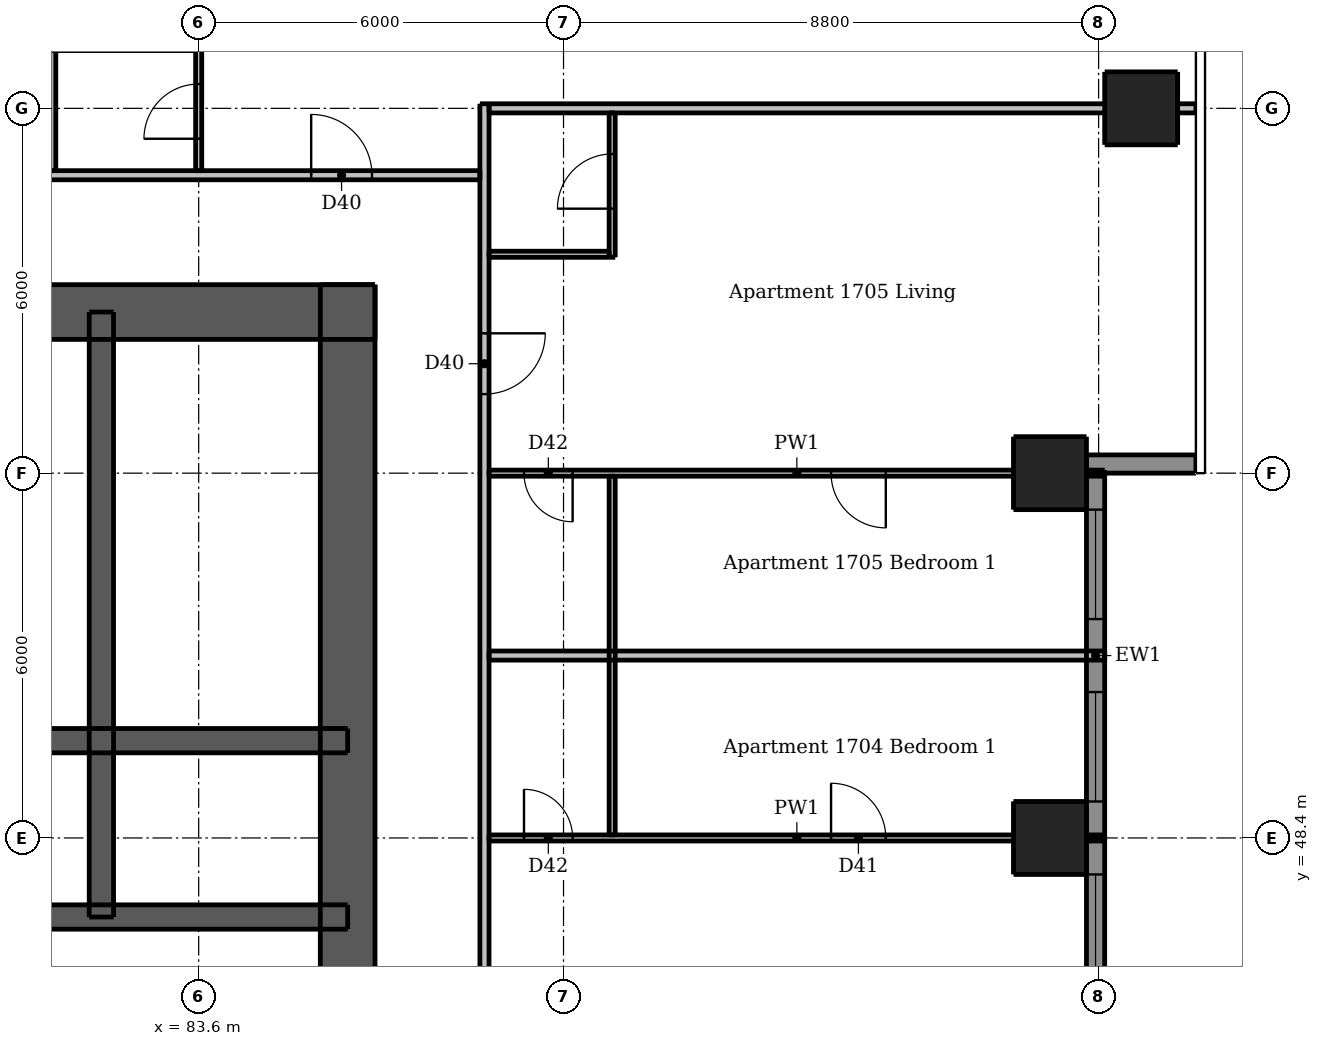
"""IFC4 building model, lengths in metres.
Left out: names, types, materials, properties, quantities, classifications, styles, units other than length and angle.
Written with IfcOpenShell. Run it as: python <this file> out.ifc"""

import sys

from ifc_helpers import new_model, si_unit, direction, frame, frame_2d, origin, origin_2d, place, context, subcontext, project, spatial, rectangle, extrude, element, fill, save


model = new_model("IFC4")
c1 = context("Model", 3, precision=1e-05, world=origin(), true_north=direction((0.0, 1.0)))
c2 = subcontext(c1, "Body", "Model", "MODEL_VIEW")
j1 = project(units=[si_unit("LENGTHUNIT", "METRE"), si_unit("PLANEANGLEUNIT", "RADIAN")], contexts=[c1])
p1 = place(None, origin())
s1 = spatial("IfcSite", under=j1, at=p1, CompositionType="ELEMENT")
p2 = place(p1, origin())
s2 = spatial("IfcBuilding", under=s1, at=p2, CompositionType="ELEMENT")
p3 = place(p2, frame((0.0, 0.0, 63.1)))
s3 = spatial("IfcBuildingStorey", under=s2, at=p3, CompositionType="ELEMENT", Elevation=63.1)
p4 = place(p3, frame((62.5, 57.05, 0.0), z_axis=(0.0, 0.0, 1.0), x_axis=(1.0, 0.0, 0.0)))
e1 = element("IfcWall", 1, at=p4, inside=s3, PredefinedType="SHEAR", context=c2, shape_type="SweptSolid", body=[
    extrude(rectangle(XDim=24.0, YDim=0.9, at=frame_2d((12.0, 0.0))), origin(), (0.0, 0.0, 1.0), 3.05),
])
p5 = place(p4, frame((20.85, 0.0, 0.0)))
e2 = element("IfcOpeningElement", 2, at=p5, cuts=e1, PredefinedType="OPENING", context=c2, shape_type="SweptSolid", body=[
    extrude(rectangle(XDim=1.1, YDim=2.1, at=frame_2d((0.55, 1.05))), frame((0.0, 0.46, 0.0), z_axis=(0.0, -1.0, 0.0), x_axis=(1.0, 0.0, 0.0)), (0.0, 0.0, 1.0), 0.92),
])
p6 = place(p4, frame((2.05, 0.0, 0.0)))
e3 = element("IfcOpeningElement", 3, at=p6, cuts=e1, PredefinedType="OPENING", context=c2, shape_type="SweptSolid", body=[
    extrude(rectangle(XDim=1.1, YDim=2.1, at=frame_2d((0.55, 1.05))), frame((0.0, 0.46, 0.0), z_axis=(0.0, -1.0, 0.0), x_axis=(1.0, 0.0, 0.0)), (0.0, 0.0, 1.0), 0.92),
])
p7 = place(p4, frame((6.44, 0.0, 0.0)))
e4 = element("IfcOpeningElement", 4, at=p7, cuts=e1, PredefinedType="OPENING", context=c2, shape_type="SweptSolid", body=[
    extrude(rectangle(XDim=0.9, YDim=2.1, at=frame_2d((0.45, 1.05))), frame((0.0, 0.46, 0.0), z_axis=(0.0, -1.0, 0.0), x_axis=(1.0, 0.0, 0.0)), (0.0, 0.0, 1.0), 0.92),
])
p8 = place(p4, frame((13.74, 0.0, 0.0)))
e5 = element("IfcOpeningElement", 5, at=p8, cuts=e1, PredefinedType="OPENING", context=c2, shape_type="SweptSolid", body=[
    extrude(rectangle(XDim=0.9, YDim=2.1, at=frame_2d((0.45, 1.05))), frame((0.0, 0.46, 0.0), z_axis=(0.0, -1.0, 0.0), x_axis=(1.0, 0.0, 0.0)), (0.0, 0.0, 1.0), 0.92),
])
p9 = place(p3, frame((86.05, 33.5, 0.0), z_axis=(0.0, 0.0, 1.0), x_axis=(0.0, 1.0, 0.0)))
e6 = element("IfcWall", 6, at=p9, inside=s3, PredefinedType="SHEAR", context=c2, shape_type="SweptSolid", body=[
    extrude(rectangle(XDim=24.0, YDim=0.9, at=frame_2d((12.0, 0.0))), origin(), (0.0, 0.0, 1.0), 3.05),
])
p10 = place(p9, frame((11.2, 0.0, 0.0)))
e7 = element("IfcOpeningElement", 7, at=p10, cuts=e6, PredefinedType="OPENING", context=c2, shape_type="SweptSolid", body=[
    extrude(rectangle(XDim=1.6, YDim=2.1, at=frame_2d((0.8, 1.05))), frame((0.0, 0.46, 0.0), z_axis=(0.0, -1.0, 0.0), x_axis=(1.0, 0.0, 0.0)), (0.0, 0.0, 1.0), 0.92),
])
p11 = place(p3, frame((62.95, 47.1, 0.0), z_axis=(0.0, 0.0, 1.0), x_axis=(1.0, 0.0, 0.0)))
e8 = element("IfcWall", 8, at=p11, inside=s3, PredefinedType="SHEAR", context=c2, shape_type="SweptSolid", body=[
    extrude(rectangle(XDim=23.1, YDim=0.4, at=frame_2d((11.55, 0.0))), origin(), (0.0, 0.0, 1.0), 3.05),
])
p12 = place(p11, frame((0.662, 0.0, 0.0)))
e9 = element("IfcOpeningElement", 9, at=p12, cuts=e8, PredefinedType="OPENING", context=c2, shape_type="SweptSolid", body=[
    extrude(rectangle(XDim=0.8, YDim=2.1, at=frame_2d((0.4, 1.05))), frame((0.0, 0.21, 0.0), z_axis=(0.0, -1.0, 0.0), x_axis=(1.0, 0.0, 0.0)), (0.0, 0.0, 1.0), 0.42),
])
p13 = place(p11, frame((2.312, 0.0, 0.0)))
e10 = element("IfcOpeningElement", 10, at=p13, cuts=e8, PredefinedType="OPENING", context=c2, shape_type="SweptSolid", body=[
    extrude(rectangle(XDim=0.9, YDim=2.1, at=frame_2d((0.45, 1.05))), frame((0.0, 0.21, 0.0), z_axis=(0.0, -1.0, 0.0), x_axis=(1.0, 0.0, 0.0)), (0.0, 0.0, 1.0), 0.42),
])
p14 = place(p11, frame((20.5, 0.0, 0.0)))
e11 = element("IfcOpeningElement", 11, at=p14, cuts=e8, PredefinedType="OPENING", context=c2, shape_type="SweptSolid", body=[
    extrude(rectangle(XDim=0.9, YDim=2.1, at=frame_2d((0.45, 1.05))), frame((0.0, 0.21, 0.0), z_axis=(0.0, -1.0, 0.0), x_axis=(1.0, 0.0, 0.0)), (0.0, 0.0, 1.0), 0.42),
])
p15 = place(p3, frame((62.95, 50.0, 0.0), z_axis=(0.0, 0.0, 1.0), x_axis=(1.0, 0.0, 0.0)))
e12 = element("IfcWall", 12, at=p15, inside=s3, PredefinedType="SHEAR", context=c2, shape_type="SweptSolid", body=[
    extrude(rectangle(XDim=23.1, YDim=0.4, at=frame_2d((11.55, 0.0))), origin(), (0.0, 0.0, 1.0), 3.05),
])
p16 = place(p3, frame((82.0, 47.1, 0.0), z_axis=(0.0, 0.0, 1.0), x_axis=(0.0, 1.0, 0.0)))
e13 = element("IfcWall", 13, at=p16, inside=s3, PredefinedType="SHEAR", context=c2, shape_type="SweptSolid", body=[
    extrude(rectangle(XDim=9.95, YDim=0.4, at=frame_2d((4.975, 0.0))), origin(), (0.0, 0.0, 1.0), 3.05),
])
for number, where, z_axis, x_axis in (
    (14, (97.6, 48.4, 0.0), (0.0, 0.0, 1.0), (1.0, 0.0, 0.0)),
    (15, (97.6, 54.4, 0.0), (0.0, 0.0, 1.0), (1.0, 0.0, 0.0)),
    (16, (99.1, 60.4, 0.0), (0.0, 0.0, 1.0), (1.0, 0.0, 0.0)),
):
    element("IfcColumn", number, at=place(p3, frame(where, z_axis=z_axis, x_axis=x_axis)), inside=s3, PredefinedType="COLUMN", context=c2, shape_type="SweptSolid", body=[
        extrude(rectangle(XDim=1.2, YDim=1.2, at=origin_2d()), origin(), (0.0, 0.0, 1.0), 3.05),
    ])
p17 = place(p3, frame((98.2, 54.55, 0.0), z_axis=(0.0, 0.0, 1.0), x_axis=(1.0, 0.0, 0.0)))
e17 = element("IfcWall", 17, at=p17, inside=s3, PredefinedType="SOLIDWALL", context=c2, shape_type="SweptSolid", body=[
    extrude(rectangle(XDim=1.8, YDim=0.3, at=frame_2d((0.9, 0.0))), origin(), (0.0, 0.0, 1.0), 3.05),
])
p18 = place(p3, frame((98.35, 42.7, 0.0), z_axis=(0.0, 0.0, 1.0), x_axis=(0.0, 1.0, 0.0)))
e18 = element("IfcWall", 18, at=p18, inside=s3, PredefinedType="SOLIDWALL", context=c2, shape_type="SweptSolid", body=[
    extrude(rectangle(XDim=5.7, YDim=0.3, at=frame_2d((2.85, 0.0))), origin(), (0.0, 0.0, 1.0), 3.05),
])
p19 = place(p18, frame((0.3, 0.0, 0.15)))
e19 = element("IfcOpeningElement", 19, at=p19, cuts=e18, PredefinedType="OPENING", context=c2, shape_type="SweptSolid", body=[
    extrude(rectangle(XDim=1.8, YDim=2.1, at=frame_2d((0.9, 1.05))), frame((0.0, 0.16, 0.0), z_axis=(0.0, -1.0, 0.0), x_axis=(1.0, 0.0, 0.0)), (0.0, 0.0, 1.0), 0.32),
])
p20 = place(p18, frame((3.3, 0.0, 0.15)))
e20 = element("IfcOpeningElement", 20, at=p20, cuts=e18, PredefinedType="OPENING", context=c2, shape_type="SweptSolid", body=[
    extrude(rectangle(XDim=1.8, YDim=2.1, at=frame_2d((0.9, 1.05))), frame((0.0, 0.16, 0.0), z_axis=(0.0, -1.0, 0.0), x_axis=(1.0, 0.0, 0.0)), (0.0, 0.0, 1.0), 0.32),
])
p21 = place(p3, frame((98.35, 48.4, 0.0), z_axis=(0.0, 0.0, 1.0), x_axis=(0.0, 1.0, 0.0)))
e21 = element("IfcWall", 21, at=p21, inside=s3, PredefinedType="SOLIDWALL", context=c2, shape_type="SweptSolid", body=[
    extrude(rectangle(XDim=6.0, YDim=0.3, at=frame_2d((3.0, 0.0))), origin(), (0.0, 0.0, 1.0), 3.05),
])
p22 = place(p21, frame((0.6, 0.0, 0.15)))
e22 = element("IfcOpeningElement", 22, at=p22, cuts=e21, PredefinedType="OPENING", context=c2, shape_type="SweptSolid", body=[
    extrude(rectangle(XDim=1.8, YDim=2.1, at=frame_2d((0.9, 1.05))), frame((0.0, 0.16, 0.0), z_axis=(0.0, -1.0, 0.0), x_axis=(1.0, 0.0, 0.0)), (0.0, 0.0, 1.0), 0.32),
])
p23 = place(p21, frame((3.6, 0.0, 0.15)))
e23 = element("IfcOpeningElement", 23, at=p23, cuts=e21, PredefinedType="OPENING", context=c2, shape_type="SweptSolid", body=[
    extrude(rectangle(XDim=1.8, YDim=2.1, at=frame_2d((0.9, 1.05))), frame((0.0, 0.16, 0.0), z_axis=(0.0, -1.0, 0.0), x_axis=(1.0, 0.0, 0.0)), (0.0, 0.0, 1.0), 0.32),
])
p24 = place(p3, frame((81.2, 59.375, 0.0), z_axis=(0.0, 0.0, 1.0), x_axis=(0.0, 1.0, 0.0)))
e24 = element("IfcWall", 24, at=p24, inside=s3, PredefinedType="PARTITIONING", context=c2, shape_type="SweptSolid", body=[
    extrude(rectangle(XDim=1.975, YDim=0.1, at=frame_2d((0.988, 0.0))), origin(), (0.0, 0.0, 1.0), 3.05),
])
p25 = place(p3, frame((83.6, 59.375, 0.0), z_axis=(0.0, 0.0, 1.0), x_axis=(0.0, 1.0, 0.0)))
e25 = element("IfcWall", 25, at=p25, inside=s3, PredefinedType="PARTITIONING", context=c2, shape_type="SweptSolid", body=[
    extrude(rectangle(XDim=8.625, YDim=0.1, at=frame_2d((4.312, 0.0))), origin(), (0.0, 0.0, 1.0), 2.516),
])
p26 = place(p25, frame((0.525, 0.0, 0.0)))
e26 = element("IfcOpeningElement", 26, at=p26, cuts=e25, PredefinedType="OPENING", context=c2, shape_type="SweptSolid", body=[
    extrude(rectangle(XDim=0.9, YDim=2.1, at=frame_2d((0.45, 1.05))), frame((0.0, 0.06, 0.0), z_axis=(0.0, -1.0, 0.0), x_axis=(1.0, 0.0, 0.0)), (0.0, 0.0, 1.0), 0.12),
])
p27 = place(p25, frame((4.875, 0.0, 0.0)))
e27 = element("IfcOpeningElement", 27, at=p27, cuts=e25, PredefinedType="OPENING", context=c2, shape_type="SweptSolid", body=[
    extrude(rectangle(XDim=0.9, YDim=2.1, at=frame_2d((0.45, 1.05))), frame((0.0, 0.06, 0.0), z_axis=(0.0, -1.0, 0.0), x_axis=(1.0, 0.0, 0.0)), (0.0, 0.0, 1.0), 0.12),
])
p28 = place(p3, frame((90.4, 48.45, 0.0), z_axis=(0.0, 0.0, 1.0), x_axis=(0.0, 1.0, 0.0)))
e28 = element("IfcWall", 28, at=p28, inside=s3, PredefinedType="PARTITIONING", context=c2, shape_type="SweptSolid", body=[
    extrude(rectangle(XDim=5.9, YDim=0.1, at=frame_2d((2.95, 0.0))), origin(), (0.0, 0.0, 1.0), 3.05),
])
p29 = place(p3, frame((90.4, 57.95, 0.0), z_axis=(0.0, 0.0, 1.0), x_axis=(0.0, 1.0, 0.0)))
e29 = element("IfcWall", 29, at=p29, inside=s3, PredefinedType="PARTITIONING", context=c2, shape_type="SweptSolid", body=[
    extrude(rectangle(XDim=2.375, YDim=0.1, at=frame_2d((1.188, 0.0))), origin(), (0.0, 0.0, 1.0), 3.05),
])
p30 = place(p29, frame((0.8, 0.0, 0.0)))
e30 = element("IfcOpeningElement", 30, at=p30, cuts=e29, PredefinedType="OPENING", context=c2, shape_type="SweptSolid", body=[
    extrude(rectangle(XDim=0.9, YDim=2.1, at=frame_2d((0.45, 1.05))), frame((0.0, 0.06, 0.0), z_axis=(0.0, -1.0, 0.0), x_axis=(1.0, 0.0, 0.0)), (0.0, 0.0, 1.0), 0.12),
])
p31 = place(p3, frame((88.375, 58.0, 0.0), z_axis=(0.0, 0.0, 1.0), x_axis=(1.0, 0.0, 0.0)))
e31 = element("IfcWall", 31, at=p31, inside=s3, PredefinedType="PARTITIONING", context=c2, shape_type="SweptSolid", body=[
    extrude(rectangle(XDim=1.975, YDim=0.1, at=frame_2d((0.988, 0.0))), origin(), (0.0, 0.0, 1.0), 3.05),
])
p32 = place(p3, frame((98.5, 54.4, 0.0), z_axis=(0.0, 0.0, 1.0), x_axis=(-1.0, 0.0, 0.0)))
e32 = element("IfcWall", 32, at=p32, inside=s3, PredefinedType="PARTITIONING", context=c2, shape_type="SweptSolid", body=[
    extrude(rectangle(XDim=10.125, YDim=0.1, at=frame_2d((5.062, 0.0))), origin(), (0.0, 0.0, 1.0), 2.516),
])
p33 = place(p32, frame((3.6, 0.0, 0.0)))
e33 = element("IfcOpeningElement", 33, at=p33, cuts=e32, PredefinedType="OPENING", context=c2, shape_type="SweptSolid", body=[
    extrude(rectangle(XDim=0.9, YDim=2.1, at=frame_2d((0.45, 1.05))), frame((0.0, 0.06, 0.0), z_axis=(0.0, -1.0, 0.0), x_axis=(1.0, 0.0, 0.0)), (0.0, 0.0, 1.0), 0.12),
])
p34 = place(p32, frame((8.75, 0.0, 0.0)))
e34 = element("IfcOpeningElement", 34, at=p34, cuts=e32, PredefinedType="OPENING", context=c2, shape_type="SweptSolid", body=[
    extrude(rectangle(XDim=0.8, YDim=2.1, at=frame_2d((0.4, 1.05))), frame((0.0, 0.06, 0.0), z_axis=(0.0, -1.0, 0.0), x_axis=(1.0, 0.0, 0.0)), (0.0, 0.0, 1.0), 0.12),
])
p35 = place(p3, frame((88.375, 48.4, 0.0), z_axis=(0.0, 0.0, 1.0), x_axis=(1.0, 0.0, 0.0)))
e35 = element("IfcWall", 35, at=p35, inside=s3, PredefinedType="PARTITIONING", context=c2, shape_type="SweptSolid", body=[
    extrude(rectangle(XDim=10.125, YDim=0.1, at=frame_2d((5.062, 0.0))), origin(), (0.0, 0.0, 1.0), 2.516),
])
p36 = place(p35, frame((5.625, 0.0, 0.0)))
e36 = element("IfcOpeningElement", 36, at=p36, cuts=e35, PredefinedType="OPENING", context=c2, shape_type="SweptSolid", body=[
    extrude(rectangle(XDim=0.9, YDim=2.1, at=frame_2d((0.45, 1.05))), frame((0.0, 0.06, 0.0), z_axis=(0.0, -1.0, 0.0), x_axis=(1.0, 0.0, 0.0)), (0.0, 0.0, 1.0), 0.12),
])
p37 = place(p35, frame((0.575, 0.0, 0.0)))
e37 = element("IfcOpeningElement", 37, at=p37, cuts=e35, PredefinedType="OPENING", context=c2, shape_type="SweptSolid", body=[
    extrude(rectangle(XDim=0.8, YDim=2.1, at=frame_2d((0.4, 1.05))), frame((0.0, 0.06, 0.0), z_axis=(0.0, -1.0, 0.0), x_axis=(1.0, 0.0, 0.0)), (0.0, 0.0, 1.0), 0.12),
])
p38 = place(p3, frame((88.3, 60.475, 0.0), z_axis=(0.0, 0.0, 1.0), x_axis=(0.0, -1.0, 0.0)))
e38 = element("IfcWall", 38, at=p38, inside=s3, PredefinedType="PARTITIONING", context=c2, shape_type="SweptSolid", body=[
    extrude(rectangle(XDim=28.7, YDim=0.15, at=frame_2d((14.35, 0.0))), origin(), (0.0, 0.0, 1.0), 3.05),
])
p39 = place(p38, frame((27.425, 0.0, 0.0)))
e39 = element("IfcOpeningElement", 39, at=p39, cuts=e38, PredefinedType="OPENING", context=c2, shape_type="SweptSolid", body=[
    extrude(rectangle(XDim=1.0, YDim=2.1, at=frame_2d((0.5, 1.05))), frame((0.0, 0.085, 0.0), z_axis=(0.0, -1.0, 0.0), x_axis=(1.0, 0.0, 0.0)), (0.0, 0.0, 1.0), 0.17),
])
p40 = place(p38, frame((14.525, 0.0, 0.0)))
e40 = element("IfcOpeningElement", 40, at=p40, cuts=e38, PredefinedType="OPENING", context=c2, shape_type="SweptSolid", body=[
    extrude(rectangle(XDim=1.0, YDim=2.1, at=frame_2d((0.5, 1.05))), frame((0.0, 0.085, 0.0), z_axis=(0.0, -1.0, 0.0), x_axis=(1.0, 0.0, 0.0)), (0.0, 0.0, 1.0), 0.17),
])
p41 = place(p38, frame((3.775, 0.0, 0.0)))
e41 = element("IfcOpeningElement", 41, at=p41, cuts=e38, PredefinedType="OPENING", context=c2, shape_type="SweptSolid", body=[
    extrude(rectangle(XDim=1.0, YDim=2.1, at=frame_2d((0.5, 1.05))), frame((0.0, 0.085, 0.0), z_axis=(0.0, -1.0, 0.0), x_axis=(1.0, 0.0, 0.0)), (0.0, 0.0, 1.0), 0.17),
])
p42 = place(p3, frame((88.375, 60.4, 0.0), z_axis=(0.0, 0.0, 1.0), x_axis=(1.0, 0.0, 0.0)))
e42 = element("IfcWall", 42, at=p42, inside=s3, PredefinedType="PARTITIONING", context=c2, shape_type="SweptSolid", body=[
    extrude(rectangle(XDim=11.625, YDim=0.15, at=frame_2d((5.812, 0.0))), origin(), (0.0, 0.0, 1.0), 2.516),
])
p43 = place(p3, frame((59.675, 59.3, 0.0), z_axis=(0.0, 0.0, 1.0), x_axis=(1.0, 0.0, 0.0)))
e43 = element("IfcWall", 43, at=p43, inside=s3, PredefinedType="PARTITIONING", context=c2, shape_type="SweptSolid", body=[
    extrude(rectangle(XDim=28.55, YDim=0.15, at=frame_2d((14.275, 0.0))), origin(), (0.0, 0.0, 1.0), 3.05),
])
p44 = place(p43, frame((3.625, 0.0, 0.0)))
e44 = element("IfcOpeningElement", 44, at=p44, cuts=e43, PredefinedType="OPENING", context=c2, shape_type="SweptSolid", body=[
    extrude(rectangle(XDim=1.0, YDim=2.1, at=frame_2d((0.5, 1.05))), frame((0.0, 0.085, 0.0), z_axis=(0.0, -1.0, 0.0), x_axis=(1.0, 0.0, 0.0)), (0.0, 0.0, 1.0), 0.17),
])
p45 = place(p43, frame((14.425, 0.0, 0.0)))
e45 = element("IfcOpeningElement", 45, at=p45, cuts=e43, PredefinedType="OPENING", context=c2, shape_type="SweptSolid", body=[
    extrude(rectangle(XDim=1.0, YDim=2.1, at=frame_2d((0.5, 1.05))), frame((0.0, 0.085, 0.0), z_axis=(0.0, -1.0, 0.0), x_axis=(1.0, 0.0, 0.0)), (0.0, 0.0, 1.0), 0.17),
])
p46 = place(p43, frame((25.775, 0.0, 0.0)))
e46 = element("IfcOpeningElement", 46, at=p46, cuts=e43, PredefinedType="OPENING", context=c2, shape_type="SweptSolid", body=[
    extrude(rectangle(XDim=1.0, YDim=2.1, at=frame_2d((0.5, 1.05))), frame((0.0, 0.085, 0.0), z_axis=(0.0, -1.0, 0.0), x_axis=(1.0, 0.0, 0.0)), (0.0, 0.0, 1.0), 0.17),
])
p47 = place(p3, frame((88.375, 51.4, 0.0), z_axis=(0.0, 0.0, 1.0), x_axis=(1.0, 0.0, 0.0)))
e47 = element("IfcWall", 47, at=p47, inside=s3, PredefinedType="PARTITIONING", context=c2, shape_type="SweptSolid", body=[
    extrude(rectangle(XDim=10.125, YDim=0.15, at=frame_2d((5.062, 0.0))), origin(), (0.0, 0.0, 1.0), 3.05),
])
p48 = place(p20, origin())
e48 = element("IfcWindow", 48, at=p48, inside=s3, PartitioningType="DOUBLE_PANEL_VERTICAL", PredefinedType="WINDOW", context=c2, shape_type="SweptSolid", body=[
    extrude(rectangle(XDim=1.8, YDim=2.1, at=frame_2d((0.9, 1.05))), frame((0.0, 0.03, 0.0), z_axis=(0.0, -1.0, 0.0), x_axis=(1.0, 0.0, 0.0)), (0.0, 0.0, 1.0), 0.06),
])
fill(e20, e48)
p49 = place(p22, origin())
e49 = element("IfcWindow", 49, at=p49, inside=s3, PartitioningType="DOUBLE_PANEL_VERTICAL", PredefinedType="WINDOW", context=c2, shape_type="SweptSolid", body=[
    extrude(rectangle(XDim=1.8, YDim=2.1, at=frame_2d((0.9, 1.05))), frame((0.0, 0.03, 0.0), z_axis=(0.0, -1.0, 0.0), x_axis=(1.0, 0.0, 0.0)), (0.0, 0.0, 1.0), 0.06),
])
fill(e22, e49)
p50 = place(p23, origin())
e50 = element("IfcWindow", 50, at=p50, inside=s3, PartitioningType="DOUBLE_PANEL_VERTICAL", PredefinedType="WINDOW", context=c2, shape_type="SweptSolid", body=[
    extrude(rectangle(XDim=1.8, YDim=2.1, at=frame_2d((0.9, 1.05))), frame((0.0, 0.03, 0.0), z_axis=(0.0, -1.0, 0.0), x_axis=(1.0, 0.0, 0.0)), (0.0, 0.0, 1.0), 0.06),
])
fill(e23, e50)
p51 = place(p5, origin())
e51 = element("IfcDoor", 51, at=p51, inside=s3, OperationType="SINGLE_SWING_RIGHT", PredefinedType="DOOR", context=c2, shape_type="SweptSolid", body=[
    extrude(rectangle(XDim=1.1, YDim=2.1, at=frame_2d((0.55, 1.05))), frame((0.0, -0.388, 0.0), z_axis=(0.0, -1.0, 0.0), x_axis=(1.0, 0.0, 0.0)), (0.0, 0.0, 1.0), 0.05),
])
fill(e2, e51)
p52 = place(p14, origin())
e52 = element("IfcDoor", 52, at=p52, inside=s3, OperationType="SINGLE_SWING_LEFT", PredefinedType="DOOR", context=c2, shape_type="SweptSolid", body=[
    extrude(rectangle(XDim=0.9, YDim=2.1, at=frame_2d((0.45, 1.05))), frame((0.0, 0.188, 0.0), z_axis=(0.0, -1.0, 0.0), x_axis=(1.0, 0.0, 0.0)), (0.0, 0.0, 1.0), 0.05),
])
fill(e11, e52)
p53 = place(p36, origin())
e53 = element("IfcDoor", 53, at=p53, inside=s3, OperationType="SINGLE_SWING_LEFT", PredefinedType="DOOR", context=c2, shape_type="SweptSolid", body=[
    extrude(rectangle(XDim=0.9, YDim=2.1, at=frame_2d((0.45, 1.05))), frame((0.0, 0.025, 0.0), z_axis=(0.0, -1.0, 0.0), x_axis=(1.0, 0.0, 0.0)), (0.0, 0.0, 1.0), 0.05),
])
fill(e36, e53)
p54 = place(p37, origin())
e54 = element("IfcDoor", 54, at=p54, inside=s3, OperationType="SINGLE_SWING_LEFT", PredefinedType="DOOR", context=c2, shape_type="SweptSolid", body=[
    extrude(rectangle(XDim=0.8, YDim=2.1, at=frame_2d((0.4, 1.05))), frame((0.0, 0.025, 0.0), z_axis=(0.0, -1.0, 0.0), x_axis=(1.0, 0.0, 0.0)), (0.0, 0.0, 1.0), 0.05),
])
fill(e37, e54)
p55 = place(p41, origin())
e55 = element("IfcDoor", 55, at=p55, inside=s3, OperationType="SINGLE_SWING_LEFT", PredefinedType="DOOR", context=c2, shape_type="SweptSolid", body=[
    extrude(rectangle(XDim=1.0, YDim=2.1, at=frame_2d((0.5, 1.05))), frame((0.0, 0.025, 0.0), z_axis=(0.0, -1.0, 0.0), x_axis=(1.0, 0.0, 0.0)), (0.0, 0.0, 1.0), 0.05),
])
fill(e41, e55)
p56 = place(p30, origin())
e56 = element("IfcDoor", 56, at=p56, inside=s3, OperationType="SINGLE_SWING_LEFT", PredefinedType="DOOR", context=c2, shape_type="SweptSolid", body=[
    extrude(rectangle(XDim=0.9, YDim=2.1, at=frame_2d((0.45, 1.05))), frame((0.0, 0.025, 0.0), z_axis=(0.0, -1.0, 0.0), x_axis=(1.0, 0.0, 0.0)), (0.0, 0.0, 1.0), 0.05),
])
fill(e30, e56)
p57 = place(p33, origin())
e57 = element("IfcDoor", 57, at=p57, inside=s3, OperationType="SINGLE_SWING_LEFT", PredefinedType="DOOR", context=c2, shape_type="SweptSolid", body=[
    extrude(rectangle(XDim=0.9, YDim=2.1, at=frame_2d((0.45, 1.05))), frame((0.0, 0.025, 0.0), z_axis=(0.0, -1.0, 0.0), x_axis=(1.0, 0.0, 0.0)), (0.0, 0.0, 1.0), 0.05),
])
fill(e33, e57)
p58 = place(p34, origin())
e58 = element("IfcDoor", 58, at=p58, inside=s3, OperationType="SINGLE_SWING_LEFT", PredefinedType="DOOR", context=c2, shape_type="SweptSolid", body=[
    extrude(rectangle(XDim=0.8, YDim=2.1, at=frame_2d((0.4, 1.05))), frame((0.0, 0.025, 0.0), z_axis=(0.0, -1.0, 0.0), x_axis=(1.0, 0.0, 0.0)), (0.0, 0.0, 1.0), 0.05),
])
fill(e34, e58)
p59 = place(p46, origin())
e59 = element("IfcDoor", 59, at=p59, inside=s3, OperationType="SINGLE_SWING_LEFT", PredefinedType="DOOR", context=c2, shape_type="SweptSolid", body=[
    extrude(rectangle(XDim=1.0, YDim=2.1, at=frame_2d((0.5, 1.05))), frame((0.0, 0.025, 0.0), z_axis=(0.0, -1.0, 0.0), x_axis=(1.0, 0.0, 0.0)), (0.0, 0.0, 1.0), 0.05),
])
fill(e46, e59)
p60 = place(p26, origin())
e60 = element("IfcDoor", 60, at=p60, inside=s3, OperationType="SINGLE_SWING_LEFT", PredefinedType="DOOR", context=c2, shape_type="SweptSolid", body=[
    extrude(rectangle(XDim=0.9, YDim=2.1, at=frame_2d((0.45, 1.05))), frame((0.0, 0.025, 0.0), z_axis=(0.0, -1.0, 0.0), x_axis=(1.0, 0.0, 0.0)), (0.0, 0.0, 1.0), 0.05),
])
fill(e26, e60)
save(model, sys.argv[1])
